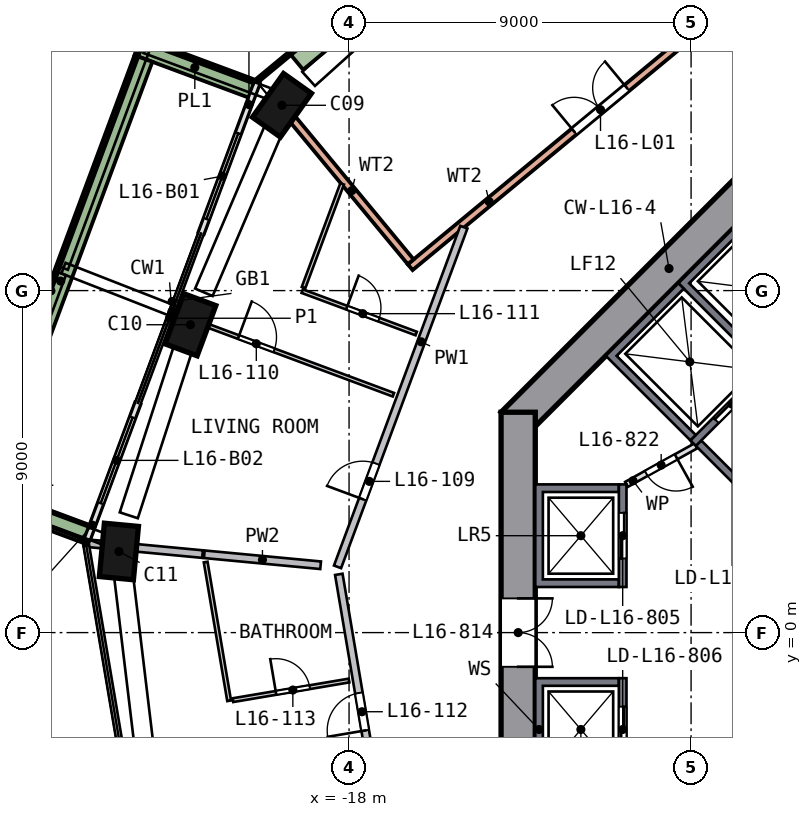
"""IFC4 building model, lengths in metres.
Left out: names, types, materials, properties, quantities, classifications, styles, units other than length and angle.
Written with IfcOpenShell. Run it as: python <this file> out.ifc"""

import sys

from ifc_helpers import new_model, si_unit, direction, frame, frame_2d, origin, origin_2d, place, context, subcontext, project, spatial, polyline, rectangle, outline, extrude, element, fill, save


model = new_model("IFC4")
c1 = context("Model", 3, precision=1e-05, world=origin(), true_north=direction((0.0, 1.0)))
c2 = subcontext(c1, "Body", "Model", "MODEL_VIEW")
j1 = project(units=[si_unit("LENGTHUNIT", "METRE"), si_unit("PLANEANGLEUNIT", "RADIAN")], contexts=[c1])
p1 = place(None, origin())
s1 = spatial("IfcSite", under=j1, at=p1, CompositionType="ELEMENT")
p2 = place(p1, origin())
s2 = spatial("IfcBuilding", under=s1, at=p2, CompositionType="ELEMENT")
p3 = place(p2, frame((0.0, 0.0, 71.5)))
s3 = spatial("IfcBuildingStorey", under=s2, at=p3, CompositionType="ELEMENT", Elevation=71.5)
p4 = place(p3, frame((-19.686, 13.99, 0.0), z_axis=(-0.065804824, -0.094180123, 0.993377989), x_axis=(0.575853797, 0.809440036, 0.11488791)))
e1 = element("IfcColumn", 1, at=p4, inside=s3, PredefinedType="COLUMN", context=c2, shape_type="SweptSolid", body=[
    extrude(rectangle(XDim=1.4, YDim=0.9, at=origin_2d()), origin(), (0.0, 0.0, 1.0), 3.02),
])
p5 = place(p3, frame((-22.128, 8.229, 0.0), z_axis=(-0.038249246, -0.105609969, 0.993671741), x_axis=(-0.346289556, -0.931379606, -0.112319069)))
e2 = element("IfcColumn", 2, at=p5, inside=s3, PredefinedType="COLUMN", context=c2, shape_type="SweptSolid", body=[
    extrude(rectangle(XDim=1.4, YDim=0.9, at=origin_2d()), origin(), (0.0, 0.0, 1.0), 3.019),
])
p6 = place(p3, frame((-24.044, 2.273, 0.0), z_axis=(-0.009781893, -0.114391555, 0.993387581), x_axis=(0.093037691, 0.989021644, 0.114804947)))
e3 = element("IfcColumn", 3, at=p6, inside=s3, PredefinedType="COLUMN", context=c2, shape_type="SweptSolid", body=[
    extrude(rectangle(XDim=1.4, YDim=0.9, at=origin_2d()), origin(), (0.0, 0.0, 1.0), 3.02),
])
p7 = place(p3, frame((-5.481, 13.682, 0.0), z_axis=(0.0, 0.0, 1.0), x_axis=(-0.707106781, -0.707106781, 0.0)))
e4 = element("IfcWall", 4, at=p7, inside=s3, PredefinedType="SHEAR", context=c2, shape_type="SweptSolid", body=[
    extrude(rectangle(XDim=11.598, YDim=0.9, at=frame_2d((5.799, 0.0))), origin(), (0.0, 0.0, 1.0), 3.5),
])
p8 = place(p3, frame((-13.55, 5.799, 0.0), z_axis=(0.0, 0.0, 1.0), x_axis=(0.0, -1.0, 0.0)))
e5 = element("IfcWall", 5, at=p8, inside=s3, PredefinedType="SHEAR", context=c2, shape_type="SweptSolid", body=[
    extrude(rectangle(XDim=11.598, YDim=0.9, at=frame_2d((5.799, 0.0))), origin(), (0.0, 0.0, 1.0), 3.5),
])
p9 = place(p8, frame((4.899, 0.0, 0.0)))
e6 = element("IfcOpeningElement", 6, at=p9, cuts=e5, PredefinedType="OPENING", context=c2, shape_type="SweptSolid", body=[
    extrude(rectangle(XDim=1.8, YDim=2.1, at=frame_2d((0.9, 1.05))), frame((0.0, 0.46, 0.0), z_axis=(0.0, -1.0, 0.0), x_axis=(1.0, 0.0, 0.0)), (0.0, 0.0, 1.0), 0.92),
])
p10 = place(p3, frame((-20.422, 14.466, 0.0), z_axis=(0.0, 0.0, 1.0), x_axis=(-0.348533865, -0.937296188, 0.0)))
e7 = element("IfcWall", 7, at=p10, inside=s3, PredefinedType="SOLIDWALL", context=c2, shape_type="SweptSolid", body=[
    extrude(rectangle(XDim=4.218, YDim=0.15, at=frame_2d((2.109, 0.0))), origin(), (0.0, 0.0, 1.0), 2.935),
])
p11 = place(p10, frame((1.417, 0.0, 0.0)))
e8 = element("IfcOpeningElement", 8, at=p11, cuts=e7, PredefinedType="OPENING", context=c2, shape_type="SweptSolid", body=[
    extrude(rectangle(XDim=2.4, YDim=2.4, at=frame_2d((1.2, 1.2))), frame((0.0, 0.085, 0.0), z_axis=(0.0, -1.0, 0.0), x_axis=(1.0, 0.0, 0.0)), (0.0, 0.0, 1.0), 0.17),
])
p12 = place(p3, frame((-23.558, 6.032, 0.0), z_axis=(0.0, 0.0, 1.0), x_axis=(-0.348566245, -0.937284147, 0.0)))
e9 = element("IfcWall", 9, at=p12, inside=s3, PredefinedType="SOLIDWALL", context=c2, shape_type="SweptSolid", body=[
    extrude(rectangle(XDim=3.842, YDim=0.15, at=frame_2d((1.921, 0.0))), origin(), (0.0, 0.0, 1.0), 2.935),
])
p13 = place(p12, frame((0.4, 0.0, 0.0)))
e10 = element("IfcOpeningElement", 10, at=p13, cuts=e9, PredefinedType="OPENING", context=c2, shape_type="SweptSolid", body=[
    extrude(rectangle(XDim=2.4, YDim=2.4, at=frame_2d((1.2, 1.2))), frame((0.0, 0.085, 0.0), z_axis=(0.0, -1.0, 0.0), x_axis=(1.0, 0.0, 0.0)), (0.0, 0.0, 1.0), 0.17),
])
p14 = place(p3, frame((-20.559, 14.314, 0.0), z_axis=(0.0, 0.0, 1.0), x_axis=(-0.937288546, 0.348554417, 0.0)))
e11 = element("IfcWall", 11, at=p14, inside=s3, PredefinedType="SOLIDWALL", context=c2, shape_type="SweptSolid", body=[
    extrude(rectangle(XDim=3.199, YDim=0.5, at=frame_2d((1.6, 0.0))), origin(), (0.0, 0.0, 1.0), 0.7),
])
p15 = place(p3, frame((-23.41, 15.108, 0.0), z_axis=(0.0, 0.0, 1.0), x_axis=(-0.348579301, -0.937279292, 0.0)))
e12 = element("IfcWall", 12, at=p15, inside=s3, PredefinedType="SOLIDWALL", context=c2, shape_type="SweptSolid", body=[
    extrude(rectangle(XDim=12.5, YDim=0.5, at=frame_2d((6.25, 0.0))), origin(), (0.0, 0.0, 1.0), 0.7),
])
p16 = place(p3, frame((-27.446, 3.539, 0.0), z_axis=(0.0, 0.0, 1.0), x_axis=(0.937288532, -0.348554455, 0.0)))
e13 = element("IfcWall", 13, at=p16, inside=s3, PredefinedType="SOLIDWALL", context=c2, shape_type="SweptSolid", body=[
    extrude(rectangle(XDim=2.699, YDim=0.5, at=frame_2d((1.349, 0.0))), origin(), (0.0, 0.0, 1.0), 0.7),
])
p17 = place(p3, frame((-16.392, 9.617, 0.0), z_axis=(0.0, 0.0, 1.0), x_axis=(0.770516134, 0.637420495, 0.0)))
e14 = element("IfcWall", 14, at=p17, inside=s3, PredefinedType="SOLIDWALL", context=c2, shape_type="SweptSolid", body=[
    extrude(rectangle(XDim=13.0, YDim=0.2, at=frame_2d((6.5, 0.0))), origin(), (0.0, 0.0, 1.0), 3.0),
])
p18 = place(p17, frame((5.6, 0.0, 0.0)))
e15 = element("IfcOpeningElement", 15, at=p18, cuts=e14, PredefinedType="OPENING", context=c2, shape_type="SweptSolid", body=[
    extrude(rectangle(XDim=1.8, YDim=2.4, at=frame_2d((0.9, 1.2))), frame((0.0, 0.11, 0.0), z_axis=(0.0, -1.0, 0.0), x_axis=(1.0, 0.0, 0.0)), (0.0, 0.0, 1.0), 0.22),
])
p19 = place(p3, frame((-19.477, 13.503, 0.0), z_axis=(0.0, 0.0, 1.0), x_axis=(0.637423805, -0.770513396, 0.0)))
e16 = element("IfcWall", 16, at=p19, inside=s3, PredefinedType="SOLIDWALL", context=c2, shape_type="SweptSolid", body=[
    extrude(rectangle(XDim=4.861, YDim=0.2, at=frame_2d((2.431, 0.0))), origin(), (0.0, 0.0, 1.0), 3.0),
])
p20 = place(p3, frame((-10.484, 22.745, 0.0), z_axis=(0.0, 0.0, 1.0), x_axis=(-0.770508957, -0.63742917, 0.0)))
e17 = element("IfcWall", 17, at=p20, inside=s3, PredefinedType="SOLIDWALL", context=c2, shape_type="SweptSolid", body=[
    extrude(rectangle(XDim=12.84, YDim=0.1, at=frame_2d((6.42, 0.0))), origin(), (0.0, 0.0, 1.0), 0.7),
])
p21 = place(p3, frame((-16.117, 17.696, 0.0), z_axis=(0.0, 0.0, 1.0), x_axis=(-0.770540333, -0.637391241, 0.0)))
e18 = element("IfcWall", 18, at=p21, inside=s3, PredefinedType="SOLIDWALL", context=c2, shape_type="SweptSolid", body=[
    extrude(rectangle(XDim=4.219, YDim=0.5, at=frame_2d((2.109, 0.0))), origin(), (0.0, 0.0, 1.0), 0.7),
])
p22 = place(p3, origin())
e19 = element("IfcWall", 19, at=p22, inside=s3, PredefinedType="SOLIDWALL", context=c2, shape_type="SweptSolid", body=[
    extrude(outline(polyline([(-13.1, 3.9), (-10.9, 3.9), (-10.9, 3.7), (-12.9, 3.7), (-12.9, 1.4), (-10.9, 1.4), (-10.9, 1.2), (-13.1, 1.2), (-13.1, 3.9)])), origin(), (0.0, 0.0, 1.0), 3.0),
])
p23 = place(p3, frame((-10.8, 1.2, 0.0), z_axis=(0.0, 0.0, 1.0), x_axis=(0.0, 1.0, 0.0)))
e20 = element("IfcWall", 20, at=p23, inside=s3, PredefinedType="SOLIDWALL", context=c2, shape_type="SweptSolid", body=[
    extrude(rectangle(XDim=2.7, YDim=0.2, at=frame_2d((1.35, 0.0))), origin(), (0.0, 0.0, 1.0), 3.0),
])
p24 = place(p23, frame((0.75, 0.0, 0.0)))
e21 = element("IfcOpeningElement", 21, at=p24, cuts=e20, PredefinedType="OPENING", context=c2, shape_type="SweptSolid", body=[
    extrude(rectangle(XDim=1.2, YDim=2.1, at=frame_2d((0.6, 1.05))), frame((0.0, 0.11, 0.0), z_axis=(0.0, -1.0, 0.0), x_axis=(1.0, 0.0, 0.0)), (0.0, 0.0, 1.0), 0.22),
])
p25 = place(p3, origin())
e22 = element("IfcWall", 22, at=p25, inside=s3, PredefinedType="SOLIDWALL", context=c2, shape_type="SweptSolid", body=[
    extrude(outline(polyline([(-13.1, -3.9), (-13.1, -1.2), (-10.9, -1.2), (-10.9, -1.4), (-12.9, -1.4), (-12.9, -3.7), (-10.9, -3.7), (-10.9, -3.9), (-13.1, -3.9)])), origin(), (0.0, 0.0, 1.0), 3.0),
])
p26 = place(p3, frame((-10.8, -1.2, 0.0), z_axis=(0.0, 0.0, 1.0), x_axis=(0.0, -1.0, 0.0)))
e23 = element("IfcWall", 23, at=p26, inside=s3, PredefinedType="SOLIDWALL", context=c2, shape_type="SweptSolid", body=[
    extrude(rectangle(XDim=2.7, YDim=0.2, at=frame_2d((1.35, 0.0))), origin(), (0.0, 0.0, 1.0), 3.0),
])
p27 = place(p26, frame((0.75, 0.0, 0.0)))
e24 = element("IfcOpeningElement", 24, at=p27, cuts=e23, PredefinedType="OPENING", context=c2, shape_type="SweptSolid", body=[
    extrude(rectangle(XDim=1.2, YDim=2.1, at=frame_2d((0.6, 1.05))), frame((0.0, 0.11, 0.0), z_axis=(0.0, -1.0, 0.0), x_axis=(1.0, 0.0, 0.0)), (0.0, 0.0, 1.0), 0.22),
])
p28 = place(p3, origin())
e25 = element("IfcWall", 25, at=p28, inside=s3, PredefinedType="SOLIDWALL", context=c2, shape_type="SweptSolid", body=[
    extrude(outline(polyline([(-9.334, 9.192), (-7.283, 11.243), (-5.056, 9.016), (-5.197, 8.874), (-7.283, 10.96), (-9.051, 9.192), (-6.965, 7.106), (-7.106, 6.965), (-9.334, 9.192)])), origin(), (0.0, 0.0, 1.0), 3.0),
])
p29 = place(p3, origin())
e26 = element("IfcWall", 26, at=p29, inside=s3, PredefinedType="SOLIDWALL", context=c2, shape_type="SweptSolid", body=[
    extrude(outline(polyline([(-11.243, 7.283), (-9.334, 9.192), (-9.192, 9.051), (-10.96, 7.283), (-8.874, 5.197), (-9.016, 5.056), (-11.243, 7.283)])), origin(), (0.0, 0.0, 1.0), 3.0),
])
p30 = place(p3, frame((-7.036, 6.894, 0.0), z_axis=(0.0, 0.0, 1.0), x_axis=(-0.707106781, -0.707106781, 0.0)))
e27 = element("IfcWall", 27, at=p30, inside=s3, PredefinedType="SOLIDWALL", context=c2, shape_type="SweptSolid", body=[
    extrude(rectangle(XDim=2.7, YDim=0.2, at=frame_2d((1.35, 0.0))), origin(), (0.0, 0.0, 1.0), 3.0),
])
p31 = place(p30, frame((0.65, 0.0, 0.0)))
e28 = element("IfcOpeningElement", 28, at=p31, cuts=e27, PredefinedType="OPENING", context=c2, shape_type="SweptSolid", body=[
    extrude(rectangle(XDim=1.2, YDim=2.1, at=frame_2d((0.6, 1.05))), frame((0.0, 0.11, 0.0), z_axis=(0.0, -1.0, 0.0), x_axis=(1.0, 0.0, 0.0)), (0.0, 0.0, 1.0), 0.22),
])
p32 = place(p3, frame((-6.823, 3.005, 0.0), z_axis=(0.0, 0.0, 1.0), x_axis=(-0.707106781, 0.707106781, 0.0)))
e29 = element("IfcWall", 29, at=p32, inside=s3, PredefinedType="SOLIDWALL", context=c2, shape_type="SweptSolid", body=[
    extrude(rectangle(XDim=2.8, YDim=0.2, at=frame_2d((1.4, 0.0))), origin(), (0.0, 0.0, 1.0), 3.0),
])
p33 = place(p3, frame((-8.874, 4.914, 0.0), z_axis=(0.0, 0.0, 1.0), x_axis=(-0.874129705, -0.485692555, 0.0)))
e30 = element("IfcWall", 30, at=p33, inside=s3, PredefinedType="PARTITIONING", context=c2, shape_type="SweptSolid", body=[
    extrude(rectangle(XDim=2.089, YDim=0.15, at=frame_2d((1.044, 0.0))), origin(), (0.0, 0.0, 1.0), 3.0),
])
p34 = place(p33, frame((0.594, 0.0, 0.0)))
e31 = element("IfcOpeningElement", 31, at=p34, cuts=e30, PredefinedType="OPENING", context=c2, shape_type="SweptSolid", body=[
    extrude(rectangle(XDim=0.9, YDim=2.1, at=frame_2d((0.45, 1.05))), frame((0.0, 0.085, 0.0), z_axis=(0.0, -1.0, 0.0), x_axis=(1.0, 0.0, 0.0)), (0.0, 0.0, 1.0), 0.17),
])
p35 = place(p3, frame((-16.716, -7.653, 0.0), z_axis=(0.0, 0.0, 1.0), x_axis=(-0.166765417, 0.9859966, 0.0)))
e32 = element("IfcWall", 32, at=p35, inside=s3, PredefinedType="SOLIDWALL", context=c2, shape_type="SweptSolid", body=[
    extrude(rectangle(XDim=9.317, YDim=0.2, at=frame_2d((4.658, 0.0))), origin(), (0.0, 0.0, 1.0), 3.0),
])
p36 = place(p35, frame((5.15, 0.0, 0.0)))
e33 = element("IfcOpeningElement", 33, at=p36, cuts=e32, PredefinedType="OPENING", context=c2, shape_type="SweptSolid", body=[
    extrude(rectangle(XDim=1.0, YDim=2.1, at=frame_2d((0.5, 1.05))), frame((0.0, 0.11, 0.0), z_axis=(0.0, -1.0, 0.0), x_axis=(1.0, 0.0, 0.0)), (0.0, 0.0, 1.0), 0.22),
])
p37 = place(p3, frame((-18.303, 1.73, 0.0), z_axis=(0.0, 0.0, 1.0), x_axis=(0.348574729, 0.937280992, 0.0)))
e34 = element("IfcWall", 34, at=p37, inside=s3, PredefinedType="SOLIDWALL", context=c2, shape_type="SweptSolid", body=[
    extrude(rectangle(XDim=9.537, YDim=0.2, at=frame_2d((4.768, 0.0))), origin(), (0.0, 0.0, 1.0), 3.0),
])
p38 = place(p37, frame((1.9, 0.0, 0.0)))
e35 = element("IfcOpeningElement", 35, at=p38, cuts=e34, PredefinedType="OPENING", context=c2, shape_type="SweptSolid", body=[
    extrude(rectangle(XDim=1.0, YDim=2.1, at=frame_2d((0.5, 1.05))), frame((0.0, 0.11, 0.0), z_axis=(0.0, -1.0, 0.0), x_axis=(1.0, 0.0, 0.0)), (0.0, 0.0, 1.0), 0.22),
])
p39 = place(p3, frame((-21.855, 2.066, 0.0), z_axis=(0.0, 0.0, 1.0), x_axis=(-0.995560459, 0.094124242, 0.0)))
e36 = element("IfcWall", 36, at=p39, inside=s3, PredefinedType="SOLIDWALL", context=c2, shape_type="SweptSolid", body=[
    extrude(rectangle(XDim=3.011, YDim=0.2, at=frame_2d((1.506, 0.0))), origin(), (0.0, 0.0, 1.0), 3.0),
])
p40 = place(p3, frame((-18.748, 1.772, 0.0), z_axis=(0.0, 0.0, 1.0), x_axis=(-0.995564081, 0.094085927, 0.0)))
e37 = element("IfcWall", 37, at=p40, inside=s3, PredefinedType="SOLIDWALL", context=c2, shape_type="SweptSolid", body=[
    extrude(rectangle(XDim=3.075, YDim=0.2, at=frame_2d((1.538, 0.0))), origin(), (0.0, 0.0, 1.0), 3.0),
])
p41 = place(p3, frame((-21.155, -1.795, 0.0), z_axis=(0.0, 0.0, 1.0), x_axis=(-0.16674987, 0.98599923, 0.0)))
e38 = element("IfcWall", 38, at=p41, inside=s3, PredefinedType="PARTITIONING", context=c2, shape_type="SweptSolid", body=[
    extrude(rectangle(XDim=3.704, YDim=0.1, at=frame_2d((1.852, 0.0))), origin(), (0.0, 0.0, 1.0), 3.0),
])
p42 = place(p3, frame((-22.596, 8.404, 0.0), z_axis=(0.0, 0.0, 1.0), x_axis=(0.937275249, -0.348590172, 0.0)))
e39 = element("IfcWall", 39, at=p42, inside=s3, PredefinedType="PARTITIONING", context=c2, shape_type="SweptSolid", body=[
    extrude(rectangle(XDim=6.15, YDim=0.1, at=frame_2d((3.075, 0.0))), origin(), (0.0, 0.0, 1.0), 3.0),
])
p43 = place(p42, frame((1.8, 0.0, 0.0)))
e40 = element("IfcOpeningElement", 40, at=p43, cuts=e39, PredefinedType="OPENING", context=c2, shape_type="SweptSolid", body=[
    extrude(rectangle(XDim=1.0, YDim=2.1, at=frame_2d((0.5, 1.05))), frame((0.0, 0.06, 0.0), z_axis=(0.0, -1.0, 0.0), x_axis=(1.0, 0.0, 0.0)), (0.0, 0.0, 1.0), 0.12),
])
p44 = place(p3, frame((-21.057, -1.778, 0.0), z_axis=(0.0, 0.0, 1.0), x_axis=(0.98599085, 0.166799411, 0.0)))
e41 = element("IfcWall", 41, at=p44, inside=s3, PredefinedType="PARTITIONING", context=c2, shape_type="SweptSolid", body=[
    extrude(rectangle(XDim=3.1, YDim=0.1, at=frame_2d((1.55, 0.0))), origin(), (0.0, 0.0, 1.0), 3.0),
])
p45 = place(p44, frame((1.15, 0.0, 0.0)))
e42 = element("IfcOpeningElement", 42, at=p45, cuts=e41, PredefinedType="OPENING", context=c2, shape_type="SweptSolid", body=[
    extrude(rectangle(XDim=0.9, YDim=2.1, at=frame_2d((0.45, 1.05))), frame((0.0, 0.06, 0.0), z_axis=(0.0, -1.0, 0.0), x_axis=(1.0, 0.0, 0.0)), (0.0, 0.0, 1.0), 0.12),
])
p46 = place(p3, frame((-18.183, 11.809, 0.0), z_axis=(0.0, 0.0, 1.0), x_axis=(-0.348567559, -0.937283659, 0.0)))
e43 = element("IfcWall", 43, at=p46, inside=s3, PredefinedType="PARTITIONING", context=c2, shape_type="SweptSolid", body=[
    extrude(rectangle(XDim=2.912, YDim=0.1, at=frame_2d((1.456, 0.0))), origin(), (0.0, 0.0, 1.0), 3.0),
])
p47 = place(p3, frame((-19.232, 8.986, 0.0), z_axis=(0.0, 0.0, 1.0), x_axis=(0.937275771, -0.348588767, 0.0)))
e44 = element("IfcWall", 44, at=p47, inside=s3, PredefinedType="PARTITIONING", context=c2, shape_type="SweptSolid", body=[
    extrude(rectangle(XDim=3.2, YDim=0.1, at=frame_2d((1.6, 0.0))), origin(), (0.0, 0.0, 1.0), 3.0),
])
p48 = place(p47, frame((1.25, 0.0, 0.0)))
e45 = element("IfcOpeningElement", 45, at=p48, cuts=e44, PredefinedType="OPENING", context=c2, shape_type="SweptSolid", body=[
    extrude(rectangle(XDim=0.9, YDim=2.1, at=frame_2d((0.45, 1.05))), frame((0.0, 0.06, 0.0), z_axis=(0.0, -1.0, 0.0), x_axis=(1.0, 0.0, 0.0)), (0.0, 0.0, 1.0), 0.12),
])
p49 = place(p11, origin())
e46 = element("IfcDoor", 46, at=p49, inside=s3, OperationType="SLIDING_TO_LEFT", PredefinedType="DOOR", context=c2, shape_type="SweptSolid", body=[
    extrude(rectangle(XDim=2.4, YDim=2.4, at=frame_2d((1.2, 1.2))), frame((0.0, 0.025, 0.0), z_axis=(0.0, -1.0, 0.0), x_axis=(1.0, 0.0, 0.0)), (0.0, 0.0, 1.0), 0.05),
])
fill(e8, e46)
p50 = place(p13, origin())
e47 = element("IfcDoor", 47, at=p50, inside=s3, OperationType="SLIDING_TO_RIGHT", PredefinedType="DOOR", context=c2, shape_type="SweptSolid", body=[
    extrude(rectangle(XDim=2.4, YDim=2.4, at=frame_2d((1.2, 1.2))), frame((0.0, 0.025, 0.0), z_axis=(0.0, -1.0, 0.0), x_axis=(1.0, 0.0, 0.0)), (0.0, 0.0, 1.0), 0.05),
])
fill(e10, e47)
p51 = place(p18, origin())
e48 = element("IfcDoor", 48, at=p51, inside=s3, OperationType="DOUBLE_DOOR_SINGLE_SWING", PredefinedType="DOOR", context=c2, shape_type="SweptSolid", body=[
    extrude(rectangle(XDim=1.8, YDim=2.4, at=frame_2d((0.9, 1.2))), frame((0.0, 0.025, 0.0), z_axis=(0.0, -1.0, 0.0), x_axis=(1.0, 0.0, 0.0)), (0.0, 0.0, 1.0), 0.05),
])
fill(e15, e48)
p52 = place(p24, origin())
e49 = element("IfcDoor", 49, at=p52, inside=s3, OperationType="DOUBLE_DOOR_SLIDING", PredefinedType="DOOR", context=c2, shape_type="SweptSolid", body=[
    extrude(rectangle(XDim=1.2, YDim=2.1, at=frame_2d((0.6, 1.05))), frame((0.0, 0.025, 0.0), z_axis=(0.0, -1.0, 0.0), x_axis=(1.0, 0.0, 0.0)), (0.0, 0.0, 1.0), 0.05),
])
fill(e21, e49)
p53 = place(p27, origin())
e50 = element("IfcDoor", 50, at=p53, inside=s3, OperationType="DOUBLE_DOOR_SLIDING", PredefinedType="DOOR", context=c2, shape_type="SweptSolid", body=[
    extrude(rectangle(XDim=1.2, YDim=2.1, at=frame_2d((0.6, 1.05))), frame((0.0, 0.025, 0.0), z_axis=(0.0, -1.0, 0.0), x_axis=(1.0, 0.0, 0.0)), (0.0, 0.0, 1.0), 0.05),
])
fill(e24, e50)
p54 = place(p31, origin())
e51 = element("IfcDoor", 51, at=p54, inside=s3, OperationType="DOUBLE_DOOR_SLIDING", PredefinedType="DOOR", context=c2, shape_type="SweptSolid", body=[
    extrude(rectangle(XDim=1.2, YDim=2.1, at=frame_2d((0.6, 1.05))), frame((0.0, 0.025, 0.0), z_axis=(0.0, -1.0, 0.0), x_axis=(1.0, 0.0, 0.0)), (0.0, 0.0, 1.0), 0.05),
])
fill(e28, e51)
p55 = place(p9, origin())
e52 = element("IfcDoor", 52, at=p55, inside=s3, OperationType="DOUBLE_DOOR_SINGLE_SWING", PredefinedType="DOOR", context=c2, shape_type="SweptSolid", body=[
    extrude(rectangle(XDim=1.8, YDim=2.1, at=frame_2d((0.9, 1.05))), frame((0.0, 0.025, 0.0), z_axis=(0.0, -1.0, 0.0), x_axis=(1.0, 0.0, 0.0)), (0.0, 0.0, 1.0), 0.05),
])
fill(e6, e52)
p56 = place(p34, origin())
e53 = element("IfcDoor", 53, at=p56, inside=s3, OperationType="SINGLE_SWING_LEFT", PredefinedType="DOOR", context=c2, shape_type="SweptSolid", body=[
    extrude(rectangle(XDim=0.9, YDim=2.1, at=frame_2d((0.45, 1.05))), frame((0.0, 0.025, 0.0), z_axis=(0.0, -1.0, 0.0), x_axis=(1.0, 0.0, 0.0)), (0.0, 0.0, 1.0), 0.05),
])
fill(e31, e53)
p57 = place(p38, origin())
e54 = element("IfcDoor", 54, at=p57, inside=s3, OperationType="SINGLE_SWING_LEFT", PredefinedType="DOOR", context=c2, shape_type="SweptSolid", body=[
    extrude(rectangle(XDim=1.0, YDim=2.1, at=frame_2d((0.5, 1.05))), frame((0.0, 0.025, 0.0), z_axis=(0.0, -1.0, 0.0), x_axis=(1.0, 0.0, 0.0)), (0.0, 0.0, 1.0), 0.05),
])
fill(e35, e54)
p58 = place(p43, origin())
e55 = element("IfcDoor", 55, at=p58, inside=s3, OperationType="SINGLE_SWING_LEFT", PredefinedType="DOOR", context=c2, shape_type="SweptSolid", body=[
    extrude(rectangle(XDim=1.0, YDim=2.1, at=frame_2d((0.5, 1.05))), frame((0.0, 0.025, 0.0), z_axis=(0.0, -1.0, 0.0), x_axis=(1.0, 0.0, 0.0)), (0.0, 0.0, 1.0), 0.05),
])
fill(e40, e55)
p59 = place(p48, origin())
e56 = element("IfcDoor", 56, at=p59, inside=s3, OperationType="SINGLE_SWING_LEFT", PredefinedType="DOOR", context=c2, shape_type="SweptSolid", body=[
    extrude(rectangle(XDim=0.9, YDim=2.1, at=frame_2d((0.45, 1.05))), frame((0.0, 0.025, 0.0), z_axis=(0.0, -1.0, 0.0), x_axis=(1.0, 0.0, 0.0)), (0.0, 0.0, 1.0), 0.05),
])
fill(e45, e56)
p60 = place(p36, origin())
e57 = element("IfcDoor", 57, at=p60, inside=s3, OperationType="SINGLE_SWING_LEFT", PredefinedType="DOOR", context=c2, shape_type="SweptSolid", body=[
    extrude(rectangle(XDim=1.0, YDim=2.1, at=frame_2d((0.5, 1.05))), frame((0.0, 0.025, 0.0), z_axis=(0.0, -1.0, 0.0), x_axis=(1.0, 0.0, 0.0)), (0.0, 0.0, 1.0), 0.05),
])
fill(e33, e57)
p61 = place(p45, origin())
e58 = element("IfcDoor", 58, at=p61, inside=s3, OperationType="SINGLE_SWING_LEFT", PredefinedType="DOOR", context=c2, shape_type="SweptSolid", body=[
    extrude(rectangle(XDim=0.9, YDim=2.1, at=frame_2d((0.45, 1.05))), frame((0.0, 0.025, 0.0), z_axis=(0.0, -1.0, 0.0), x_axis=(1.0, 0.0, 0.0)), (0.0, 0.0, 1.0), 0.05),
])
fill(e42, e58)
save(model, sys.argv[1])
